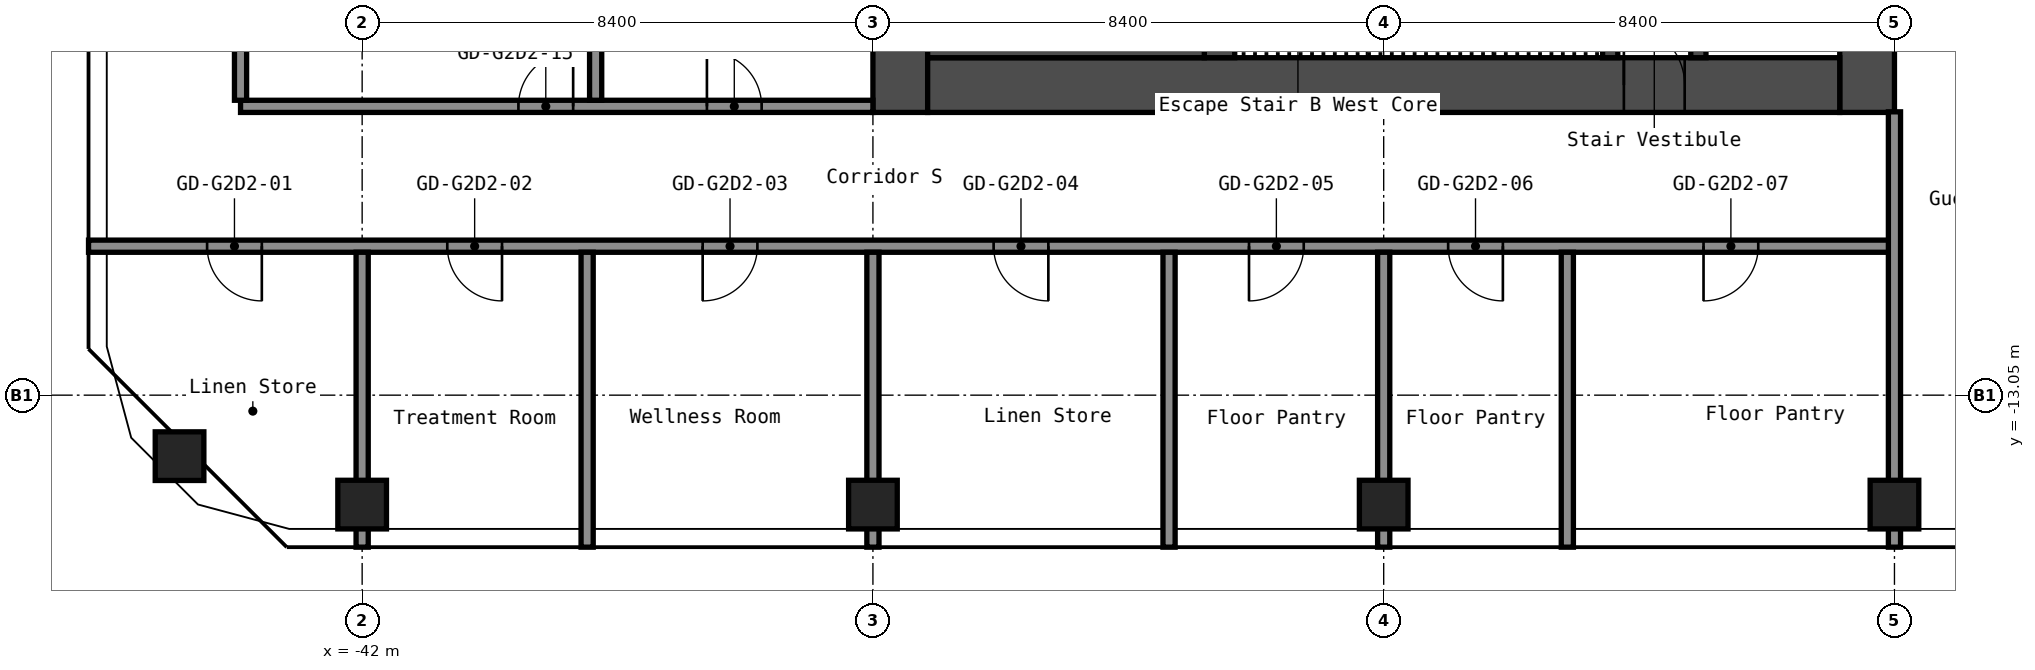
"""IFC4 building model, lengths in metres.
Left out: names, types, materials, properties, quantities, classifications, styles, units other than length and angle.
Written with IfcOpenShell. Run it as: python <this file> out.ifc"""

import sys

from ifc_helpers import new_model, si_unit, direction, frame, frame_2d, origin, origin_2d, place, context, subcontext, project, spatial, rectangle, hollow_rectangle, extrude, element, fill, save


model = new_model("IFC4")
c1 = context("Model", 3, precision=1e-05, world=origin(), true_north=direction((0.0, 1.0)))
c2 = subcontext(c1, "Body", "Model", "MODEL_VIEW")
j1 = project(units=[si_unit("LENGTHUNIT", "METRE"), si_unit("PLANEANGLEUNIT", "RADIAN")], contexts=[c1])
p1 = place(None, origin())
s1 = spatial("IfcSite", under=j1, at=p1, CompositionType="ELEMENT")
p2 = place(p1, origin())
s2 = spatial("IfcBuilding", under=s1, at=p2, CompositionType="ELEMENT")
p3 = place(p2, frame((0.0, 0.0, 117.0)))
s3 = spatial("IfcBuildingStorey", under=s2, at=p3, CompositionType="ELEMENT", Elevation=117.0)
for number, where, z_axis, x_axis in (
    (1, (-45.003, -14.053, 0.0), (0.0, 0.0, 1.0), (1.0, 0.0, 0.0)),
    (2, (-42.0, -14.85, 0.0), (0.0, 0.0, 1.0), (1.0, 0.0, 0.0)),
    (3, (-33.6, -14.85, 0.0), (0.0, 0.0, 1.0), (1.0, 0.0, 0.0)),
    (4, (-25.2, -14.85, 0.0), (0.0, 0.0, 1.0), (1.0, 0.0, 0.0)),
    (5, (-16.8, -14.85, 0.0), (0.0, 0.0, 1.0), (1.0, 0.0, 0.0)),
):
    element("IfcColumn", number, at=place(p3, frame(where, z_axis=z_axis, x_axis=x_axis)), inside=s3, PredefinedType="COLUMN", context=c2, shape_type="SweptSolid", body=[
        extrude(hollow_rectangle(XDim=0.8, YDim=0.8, WallThickness=0.032, at=origin_2d()), origin(), (0.0, 0.0, 1.0), 2.9),
    ])
p4 = place(p3, frame((-17.25, -8.4, 0.0), z_axis=(0.0, 0.0, 1.0), x_axis=(0.0, 1.0, 0.0)))
e6 = element("IfcWall", 6, at=p4, inside=s3, PredefinedType="SHEAR", context=c2, shape_type="SweptSolid", body=[
    extrude(rectangle(XDim=16.8, YDim=0.9, at=frame_2d((8.4, 0.0))), origin(), (0.0, 0.0, 1.0), 2.9),
])
p5 = place(p4, frame((7.6, 0.0, 0.0)))
e7 = element("IfcOpeningElement", 7, at=p5, cuts=e6, PredefinedType="OPENING", context=c2, shape_type="SweptSolid", body=[
    extrude(rectangle(XDim=1.2, YDim=2.1, at=frame_2d((0.6, 1.05))), frame((0.0, 0.46, 0.0), z_axis=(0.0, -1.0, 0.0), x_axis=(1.0, 0.0, 0.0)), (0.0, 0.0, 1.0), 0.92),
])
p6 = place(p3, frame((-33.15, -8.4, 0.0), z_axis=(0.0, 0.0, 1.0), x_axis=(0.0, 1.0, 0.0)))
e8 = element("IfcWall", 8, at=p6, inside=s3, PredefinedType="SHEAR", context=c2, shape_type="SweptSolid", body=[
    extrude(rectangle(XDim=16.8, YDim=0.9, at=frame_2d((8.4, 0.0))), origin(), (0.0, 0.0, 1.0), 2.9),
])
p7 = place(p3, frame((-32.7, -7.95, 0.0), z_axis=(0.0, 0.0, 1.0), x_axis=(1.0, 0.0, 0.0)))
e9 = element("IfcWall", 9, at=p7, inside=s3, PredefinedType="SHEAR", context=c2, shape_type="SweptSolid", body=[
    extrude(rectangle(XDim=15.0, YDim=0.9, at=frame_2d((7.5, 0.0))), origin(), (0.0, 0.0, 1.0), 2.9),
])
p8 = place(p7, frame((11.45, 0.0, 0.0)))
e10 = element("IfcOpeningElement", 10, at=p8, cuts=e9, PredefinedType="OPENING", context=c2, shape_type="SweptSolid", body=[
    extrude(rectangle(XDim=1.0, YDim=2.1, at=frame_2d((0.5, 1.05))), frame((0.0, 0.46, 0.0), z_axis=(0.0, -1.0, 0.0), x_axis=(1.0, 0.0, 0.0)), (0.0, 0.0, 1.0), 0.92),
])
p9 = place(p3, frame((-20.025, -7.5, 0.0), z_axis=(0.0, 0.0, 1.0), x_axis=(0.0, 1.0, 0.0)))
e11 = element("IfcWall", 11, at=p9, inside=s3, PredefinedType="SHEAR", context=c2, shape_type="SweptSolid", body=[
    extrude(rectangle(XDim=6.3, YDim=0.25, at=frame_2d((3.15, 0.0))), origin(), (0.0, 0.0, 1.0), 2.9),
])
p10 = place(p9, frame((2.4, 0.0, 0.0)))
e12 = element("IfcOpeningElement", 12, at=p10, cuts=e11, PredefinedType="OPENING", context=c2, shape_type="SweptSolid", body=[
    extrude(rectangle(XDim=1.0, YDim=2.1, at=frame_2d((0.5, 1.05))), frame((0.0, 0.135, 0.0), z_axis=(0.0, -1.0, 0.0), x_axis=(1.0, 0.0, 0.0)), (0.0, 0.0, 1.0), 0.27),
])
p11 = place(p3, frame((-21.475, -7.5, 0.0), z_axis=(0.0, 0.0, 1.0), x_axis=(0.0, 1.0, 0.0)))
e13 = element("IfcWall", 13, at=p11, inside=s3, PredefinedType="SHEAR", context=c2, shape_type="SweptSolid", body=[
    extrude(rectangle(XDim=3.75, YDim=0.25, at=frame_2d((1.875, 0.0))), origin(), (0.0, 0.0, 1.0), 2.9),
])
p12 = place(p11, frame((1.3, 0.0, 0.0)))
e14 = element("IfcOpeningElement", 14, at=p12, cuts=e13, PredefinedType="OPENING", context=c2, shape_type="SweptSolid", body=[
    extrude(rectangle(XDim=1.2, YDim=2.1, at=frame_2d((0.6, 1.05))), frame((0.0, 0.135, 0.0), z_axis=(0.0, -1.0, 0.0), x_axis=(1.0, 0.0, 0.0)), (0.0, 0.0, 1.0), 0.27),
])
p13 = place(p3, frame((-27.9, -7.5, 0.0), z_axis=(0.0, 0.0, 1.0), x_axis=(0.0, 1.0, 0.0)))
e15 = element("IfcWall", 15, at=p13, inside=s3, PredefinedType="SHEAR", context=c2, shape_type="SweptSolid", body=[
    extrude(rectangle(XDim=3.75, YDim=0.5, at=frame_2d((1.875, 0.0))), origin(), (0.0, 0.0, 1.0), 2.9),
])
p14 = place(p3, frame((-32.7, -6.75, 0.0), z_axis=(0.0, 0.0, 1.0), x_axis=(1.0, 0.0, 0.0)))
e16 = element("IfcWall", 16, at=p14, inside=s3, PredefinedType="SHEAR", context=c2, shape_type="SweptSolid", body=[
    extrude(rectangle(XDim=4.55, YDim=1.5, at=frame_2d((2.275, 0.0))), origin(), (0.0, 0.0, 1.0), 2.9),
])
p15 = place(p3, frame((-46.5, -10.6, 0.0), z_axis=(0.0, 0.0, 1.0), x_axis=(1.0, 0.0, 0.0)))
e17 = element("IfcWall", 17, at=p15, inside=s3, PredefinedType="PARTITIONING", context=c2, shape_type="SweptSolid", body=[
    extrude(rectangle(XDim=29.7, YDim=0.2, at=frame_2d((14.85, 0.0))), origin(), (0.0, 0.0, 1.0), 2.9),
])
p16 = place(p15, frame((1.95, 0.0, 0.0)))
e18 = element("IfcOpeningElement", 18, at=p16, cuts=e17, PredefinedType="OPENING", context=c2, shape_type="SweptSolid", body=[
    extrude(rectangle(XDim=0.9, YDim=2.1, at=frame_2d((0.45, 1.05))), frame((0.0, 0.11, 0.0), z_axis=(0.0, -1.0, 0.0), x_axis=(1.0, 0.0, 0.0)), (0.0, 0.0, 1.0), 0.22),
])
p17 = place(p15, frame((5.9, 0.0, 0.0)))
e19 = element("IfcOpeningElement", 19, at=p17, cuts=e17, PredefinedType="OPENING", context=c2, shape_type="SweptSolid", body=[
    extrude(rectangle(XDim=0.9, YDim=2.1, at=frame_2d((0.45, 1.05))), frame((0.0, 0.11, 0.0), z_axis=(0.0, -1.0, 0.0), x_axis=(1.0, 0.0, 0.0)), (0.0, 0.0, 1.0), 0.22),
])
p18 = place(p15, frame((10.1, 0.0, 0.0)))
e20 = element("IfcOpeningElement", 20, at=p18, cuts=e17, PredefinedType="OPENING", context=c2, shape_type="SweptSolid", body=[
    extrude(rectangle(XDim=0.9, YDim=2.1, at=frame_2d((0.45, 1.05))), frame((0.0, 0.11, 0.0), z_axis=(0.0, -1.0, 0.0), x_axis=(1.0, 0.0, 0.0)), (0.0, 0.0, 1.0), 0.22),
])
p19 = place(p15, frame((14.885, 0.0, 0.0)))
e21 = element("IfcOpeningElement", 21, at=p19, cuts=e17, PredefinedType="OPENING", context=c2, shape_type="SweptSolid", body=[
    extrude(rectangle(XDim=0.9, YDim=2.1, at=frame_2d((0.45, 1.05))), frame((0.0, 0.11, 0.0), z_axis=(0.0, -1.0, 0.0), x_axis=(1.0, 0.0, 0.0)), (0.0, 0.0, 1.0), 0.22),
])
p20 = place(p15, frame((19.085, 0.0, 0.0)))
e22 = element("IfcOpeningElement", 22, at=p20, cuts=e17, PredefinedType="OPENING", context=c2, shape_type="SweptSolid", body=[
    extrude(rectangle(XDim=0.9, YDim=2.1, at=frame_2d((0.45, 1.05))), frame((0.0, 0.11, 0.0), z_axis=(0.0, -1.0, 0.0), x_axis=(1.0, 0.0, 0.0)), (0.0, 0.0, 1.0), 0.22),
])
p21 = place(p15, frame((22.36, 0.0, 0.0)))
e23 = element("IfcOpeningElement", 23, at=p21, cuts=e17, PredefinedType="OPENING", context=c2, shape_type="SweptSolid", body=[
    extrude(rectangle(XDim=0.9, YDim=2.1, at=frame_2d((0.45, 1.05))), frame((0.0, 0.11, 0.0), z_axis=(0.0, -1.0, 0.0), x_axis=(1.0, 0.0, 0.0)), (0.0, 0.0, 1.0), 0.22),
])
p22 = place(p15, frame((26.56, 0.0, 0.0)))
e24 = element("IfcOpeningElement", 24, at=p22, cuts=e17, PredefinedType="OPENING", context=c2, shape_type="SweptSolid", body=[
    extrude(rectangle(XDim=0.9, YDim=2.1, at=frame_2d((0.45, 1.05))), frame((0.0, 0.11, 0.0), z_axis=(0.0, -1.0, 0.0), x_axis=(1.0, 0.0, 0.0)), (0.0, 0.0, 1.0), 0.22),
])
p23 = place(p3, frame((-44.0, -8.3, 0.0), z_axis=(0.0, 0.0, 1.0), x_axis=(1.0, 0.0, 0.0)))
e25 = element("IfcWall", 25, at=p23, inside=s3, PredefinedType="PARTITIONING", context=c2, shape_type="SweptSolid", body=[
    extrude(rectangle(XDim=10.4, YDim=0.2, at=frame_2d((5.2, 0.0))), origin(), (0.0, 0.0, 1.0), 2.9),
])
p24 = place(p23, frame((4.57, 0.0, 0.0)))
e26 = element("IfcOpeningElement", 26, at=p24, cuts=e25, PredefinedType="OPENING", context=c2, shape_type="SweptSolid", body=[
    extrude(rectangle(XDim=0.9, YDim=2.1, at=frame_2d((0.45, 1.05))), frame((0.0, 0.11, 0.0), z_axis=(0.0, -1.0, 0.0), x_axis=(1.0, 0.0, 0.0)), (0.0, 0.0, 1.0), 0.22),
])
p25 = place(p23, frame((7.67, 0.0, 0.0)))
e27 = element("IfcOpeningElement", 27, at=p25, cuts=e25, PredefinedType="OPENING", context=c2, shape_type="SweptSolid", body=[
    extrude(rectangle(XDim=0.9, YDim=2.1, at=frame_2d((0.45, 1.05))), frame((0.0, 0.11, 0.0), z_axis=(0.0, -1.0, 0.0), x_axis=(1.0, 0.0, 0.0)), (0.0, 0.0, 1.0), 0.22),
])
p26 = place(p3, frame((-44.0, -8.2, 0.0), z_axis=(0.0, 0.0, 1.0), x_axis=(0.0, 1.0, 0.0)))
e28 = element("IfcWall", 28, at=p26, inside=s3, PredefinedType="PARTITIONING", context=c2, shape_type="SweptSolid", body=[
    extrude(rectangle(XDim=16.4, YDim=0.2, at=frame_2d((8.2, 0.0))), origin(), (0.0, 0.0, 1.0), 2.9),
])
for number, where, z_axis, x_axis in (
    (29, (-42.0, -15.55, 0.0), (0.0, 0.0, 1.0), (0.0, 1.0, 0.0)),
    (30, (-38.3, -15.55, 0.0), (0.0, 0.0, 1.0), (0.0, 1.0, 0.0)),
):
    element("IfcWall", number, at=place(p3, frame(where, z_axis=z_axis, x_axis=x_axis)), inside=s3, PredefinedType="PARTITIONING", context=c2, shape_type="SweptSolid", body=[
        extrude(rectangle(XDim=4.85, YDim=0.2, at=frame_2d((2.425, 0.0))), origin(), (0.0, 0.0, 1.0), 2.9),
    ])
p27 = place(p3, frame((-38.16, -8.2, 0.0), z_axis=(0.0, 0.0, 1.0), x_axis=(0.0, 1.0, 0.0)))
e31 = element("IfcWall", 31, at=p27, inside=s3, PredefinedType="PARTITIONING", context=c2, shape_type="SweptSolid", body=[
    extrude(rectangle(XDim=8.2, YDim=0.2, at=frame_2d((4.1, 0.0))), origin(), (0.0, 0.0, 1.0), 2.9),
])
for number, where, z_axis, x_axis in (
    (32, (-33.6, -15.55, 0.0), (0.0, 0.0, 1.0), (0.0, 1.0, 0.0)),
    (33, (-28.73, -15.55, 0.0), (0.0, 0.0, 1.0), (0.0, 1.0, 0.0)),
    (34, (-25.2, -15.55, 0.0), (0.0, 0.0, 1.0), (0.0, 1.0, 0.0)),
    (35, (-22.18, -15.55, 0.0), (0.0, 0.0, 1.0), (0.0, 1.0, 0.0)),
):
    element("IfcWall", number, at=place(p3, frame(where, z_axis=z_axis, x_axis=x_axis)), inside=s3, PredefinedType="PARTITIONING", context=c2, shape_type="SweptSolid", body=[
        extrude(rectangle(XDim=4.85, YDim=0.2, at=frame_2d((2.425, 0.0))), origin(), (0.0, 0.0, 1.0), 2.9),
    ])
p28 = place(p3, frame((-16.8, -15.55, 0.0), z_axis=(0.0, 0.0, 1.0), x_axis=(0.0, 1.0, 0.0)))
e36 = element("IfcWall", 36, at=p28, inside=s3, PredefinedType="PARTITIONING", context=c2, shape_type="SweptSolid", body=[
    extrude(rectangle(XDim=7.16, YDim=0.2, at=frame_2d((3.58, 0.0))), origin(), (0.0, 0.0, 1.0), 2.9),
])
p29 = place(p8, origin())
e37 = element("IfcDoor", 37, at=p29, inside=s3, OperationType="SINGLE_SWING_RIGHT", PredefinedType="DOOR", context=c2, shape_type="SweptSolid", body=[
    extrude(rectangle(XDim=1.0, YDim=2.1, at=frame_2d((0.5, 1.05))), frame((0.0, 0.025, 0.0), z_axis=(0.0, -1.0, 0.0), x_axis=(1.0, 0.0, 0.0)), (0.0, 0.0, 1.0), 0.05),
])
fill(e10, e37)
p30 = place(p16, origin())
e38 = element("IfcDoor", 38, at=p30, inside=s3, OperationType="SINGLE_SWING_RIGHT", PredefinedType="DOOR", context=c2, shape_type="SweptSolid", body=[
    extrude(rectangle(XDim=0.9, YDim=2.1, at=frame_2d((0.45, 1.05))), frame((0.0, 0.025, 0.0), z_axis=(0.0, -1.0, 0.0), x_axis=(1.0, 0.0, 0.0)), (0.0, 0.0, 1.0), 0.05),
])
fill(e18, e38)
p31 = place(p17, origin())
e39 = element("IfcDoor", 39, at=p31, inside=s3, OperationType="SINGLE_SWING_RIGHT", PredefinedType="DOOR", context=c2, shape_type="SweptSolid", body=[
    extrude(rectangle(XDim=0.9, YDim=2.1, at=frame_2d((0.45, 1.05))), frame((0.0, 0.025, 0.0), z_axis=(0.0, -1.0, 0.0), x_axis=(1.0, 0.0, 0.0)), (0.0, 0.0, 1.0), 0.05),
])
fill(e19, e39)
p32 = place(p18, origin())
e40 = element("IfcDoor", 40, at=p32, inside=s3, OperationType="SINGLE_SWING_LEFT", PredefinedType="DOOR", context=c2, shape_type="SweptSolid", body=[
    extrude(rectangle(XDim=0.9, YDim=2.1, at=frame_2d((0.45, 1.05))), frame((0.0, 0.025, 0.0), z_axis=(0.0, -1.0, 0.0), x_axis=(1.0, 0.0, 0.0)), (0.0, 0.0, 1.0), 0.05),
])
fill(e20, e40)
p33 = place(p19, origin())
e41 = element("IfcDoor", 41, at=p33, inside=s3, OperationType="SINGLE_SWING_RIGHT", PredefinedType="DOOR", context=c2, shape_type="SweptSolid", body=[
    extrude(rectangle(XDim=0.9, YDim=2.1, at=frame_2d((0.45, 1.05))), frame((0.0, 0.025, 0.0), z_axis=(0.0, -1.0, 0.0), x_axis=(1.0, 0.0, 0.0)), (0.0, 0.0, 1.0), 0.05),
])
fill(e21, e41)
p34 = place(p20, origin())
e42 = element("IfcDoor", 42, at=p34, inside=s3, OperationType="SINGLE_SWING_LEFT", PredefinedType="DOOR", context=c2, shape_type="SweptSolid", body=[
    extrude(rectangle(XDim=0.9, YDim=2.1, at=frame_2d((0.45, 1.05))), frame((0.0, 0.025, 0.0), z_axis=(0.0, -1.0, 0.0), x_axis=(1.0, 0.0, 0.0)), (0.0, 0.0, 1.0), 0.05),
])
fill(e22, e42)
p35 = place(p21, origin())
e43 = element("IfcDoor", 43, at=p35, inside=s3, OperationType="SINGLE_SWING_RIGHT", PredefinedType="DOOR", context=c2, shape_type="SweptSolid", body=[
    extrude(rectangle(XDim=0.9, YDim=2.1, at=frame_2d((0.45, 1.05))), frame((0.0, 0.025, 0.0), z_axis=(0.0, -1.0, 0.0), x_axis=(1.0, 0.0, 0.0)), (0.0, 0.0, 1.0), 0.05),
])
fill(e23, e43)
p36 = place(p22, origin())
e44 = element("IfcDoor", 44, at=p36, inside=s3, OperationType="SINGLE_SWING_LEFT", PredefinedType="DOOR", context=c2, shape_type="SweptSolid", body=[
    extrude(rectangle(XDim=0.9, YDim=2.1, at=frame_2d((0.45, 1.05))), frame((0.0, 0.025, 0.0), z_axis=(0.0, -1.0, 0.0), x_axis=(1.0, 0.0, 0.0)), (0.0, 0.0, 1.0), 0.05),
])
fill(e24, e44)
p37 = place(p24, origin())
e45 = element("IfcDoor", 45, at=p37, inside=s3, OperationType="SINGLE_SWING_LEFT", PredefinedType="DOOR", context=c2, shape_type="SweptSolid", body=[
    extrude(rectangle(XDim=0.9, YDim=2.1, at=frame_2d((0.45, 1.05))), frame((0.0, 0.025, 0.0), z_axis=(0.0, -1.0, 0.0), x_axis=(1.0, 0.0, 0.0)), (0.0, 0.0, 1.0), 0.05),
])
fill(e26, e45)
p38 = place(p25, origin())
e46 = element("IfcDoor", 46, at=p38, inside=s3, OperationType="SINGLE_SWING_RIGHT", PredefinedType="DOOR", context=c2, shape_type="SweptSolid", body=[
    extrude(rectangle(XDim=0.9, YDim=2.1, at=frame_2d((0.45, 1.05))), frame((0.0, 0.025, 0.0), z_axis=(0.0, -1.0, 0.0), x_axis=(1.0, 0.0, 0.0)), (0.0, 0.0, 1.0), 0.05),
])
fill(e27, e46)
save(model, sys.argv[1])
